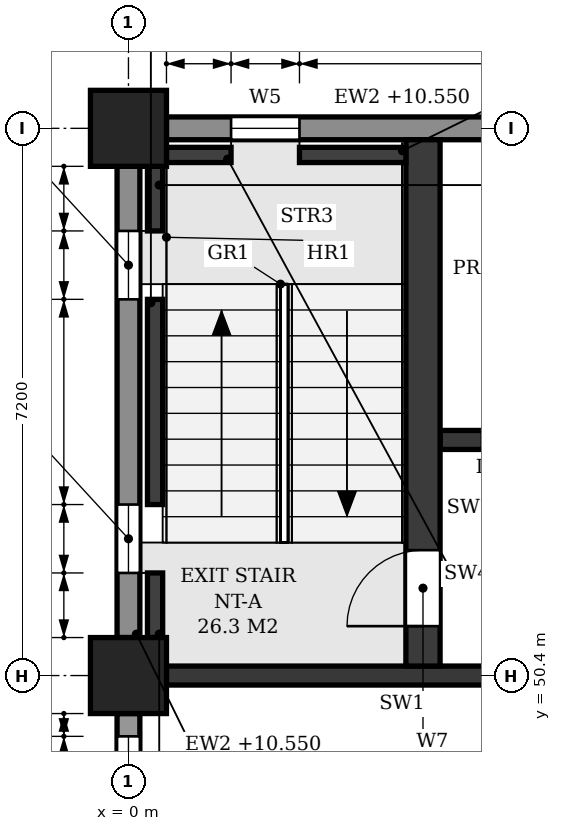
"""IFC4 building model, lengths in metres.
Left out: names, types, materials, properties, quantities, classifications, styles, units other than length and angle.
Written with IfcOpenShell. Run it as: python <this file> out.ifc"""

import sys

from ifc_helpers import new_model, si_unit, direction, frame, frame_2d, origin, origin_2d, place, context, subcontext, project, spatial, polyline, rectangle, outline, extrude, element, fill, save


model = new_model("IFC4")
c1 = context("Model", 3, precision=1e-05, world=origin(), true_north=direction((0.0, 1.0)))
c2 = subcontext(c1, "Body", "Model", "MODEL_VIEW")
j1 = project(units=[si_unit("LENGTHUNIT", "METRE"), si_unit("PLANEANGLEUNIT", "RADIAN")], contexts=[c1])
p1 = place(None, origin())
s1 = spatial("IfcSite", under=j1, at=p1, CompositionType="ELEMENT")
p2 = place(p1, origin())
s2 = spatial("IfcBuilding", under=s1, at=p2, CompositionType="ELEMENT")
p3 = place(p2, frame((0.0, 0.0, 6.0)))
s3 = spatial("IfcBuildingStorey", under=s2, at=p3, CompositionType="ELEMENT", Elevation=6.0)
for number, where, z_axis, x_axis in (
    (1, (0.0, 50.4, 0.0), (0.0, 0.0, 1.0), (1.0, 0.0, 0.0)),
    (2, (0.0, 57.6, 0.0), (0.0, 0.0, 1.0), (1.0, 0.0, 0.0)),
):
    element("IfcColumn", number, at=place(p3, frame(where, z_axis=z_axis, x_axis=x_axis)), inside=s3, PredefinedType="COLUMN", context=c2, shape_type="SweptSolid", body=[
        extrude(rectangle(XDim=1.0, YDim=1.0, at=origin_2d()), origin(), (0.0, 0.0, 1.0), 5.4),
    ])
p4 = place(p3, frame((0.0, 43.7, 0.0), z_axis=(0.0, 0.0, 1.0), x_axis=(0.0, 1.0, 0.0)))
e3 = element("IfcWall", 3, at=p4, inside=s3, PredefinedType="STANDARD", context=c2, shape_type="SweptSolid", body=[
    extrude(rectangle(XDim=6.2, YDim=0.3, at=frame_2d((3.1, 0.0))), origin(), (0.0, 0.0, 1.0), 4.55),
])
p5 = place(p4, frame((0.3, 0.0, 0.9)))
e4 = element("IfcOpeningElement", 4, at=p5, cuts=e3, PredefinedType="OPENING", context=c2, shape_type="SweptSolid", body=[
    extrude(outline(polyline([(0.0, 0.0), (0.85, 0.0), (0.85, 3.15), (0.425, 3.6), (0.0, 3.15), (0.0, 0.0)])), frame((0.0, 0.16, 0.0), z_axis=(0.0, -1.0, 0.0), x_axis=(1.0, 0.0, 0.0)), (0.0, 0.0, 1.0), 0.32),
])
p6 = place(p4, frame((1.45, 0.0, 0.9)))
e5 = element("IfcOpeningElement", 5, at=p6, cuts=e3, PredefinedType="OPENING", context=c2, shape_type="SweptSolid", body=[
    extrude(outline(polyline([(0.0, 0.0), (0.85, 0.0), (0.85, 3.15), (0.425, 3.6), (0.0, 3.15), (0.0, 0.0)])), frame((0.0, 0.16, 0.0), z_axis=(0.0, -1.0, 0.0), x_axis=(1.0, 0.0, 0.0)), (0.0, 0.0, 1.0), 0.32),
])
p7 = place(p4, frame((3.9, 0.0, 0.9)))
e6 = element("IfcOpeningElement", 6, at=p7, cuts=e3, PredefinedType="OPENING", context=c2, shape_type="SweptSolid", body=[
    extrude(outline(polyline([(0.0, 0.0), (0.85, 0.0), (0.85, 3.15), (0.425, 3.6), (0.0, 3.15), (0.0, 0.0)])), frame((0.0, 0.16, 0.0), z_axis=(0.0, -1.0, 0.0), x_axis=(1.0, 0.0, 0.0)), (0.0, 0.0, 1.0), 0.32),
])
p8 = place(p4, frame((5.05, 0.0, 0.9)))
e7 = element("IfcOpeningElement", 7, at=p8, cuts=e3, PredefinedType="OPENING", context=c2, shape_type="SweptSolid", body=[
    extrude(outline(polyline([(0.0, 0.0), (0.85, 0.0), (0.85, 3.15), (0.425, 3.6), (0.0, 3.15), (0.0, 0.0)])), frame((0.0, 0.16, 0.0), z_axis=(0.0, -1.0, 0.0), x_axis=(1.0, 0.0, 0.0)), (0.0, 0.0, 1.0), 0.32),
])
p9 = place(p3, frame((0.0, 50.9, 0.0), z_axis=(0.0, 0.0, 1.0), x_axis=(0.0, 1.0, 0.0)))
e8 = element("IfcWall", 8, at=p9, inside=s3, PredefinedType="STANDARD", context=c2, shape_type="SweptSolid", body=[
    extrude(rectangle(XDim=6.2, YDim=0.3, at=frame_2d((3.1, 0.0))), origin(), (0.0, 0.0, 1.0), 4.55),
])
p10 = place(p9, frame((0.85, 0.0, 0.9)))
e9 = element("IfcOpeningElement", 9, at=p10, cuts=e8, PredefinedType="OPENING", context=c2, shape_type="SweptSolid", body=[
    extrude(outline(polyline([(0.0, 0.0), (0.9, 0.0), (0.9, 3.15), (0.45, 3.6), (0.0, 3.15), (0.0, 0.0)])), frame((0.0, 0.16, 0.0), z_axis=(0.0, -1.0, 0.0), x_axis=(1.0, 0.0, 0.0)), (0.0, 0.0, 1.0), 0.32),
])
p11 = place(p9, frame((4.45, 0.0, 0.9)))
e10 = element("IfcOpeningElement", 10, at=p11, cuts=e8, PredefinedType="OPENING", context=c2, shape_type="SweptSolid", body=[
    extrude(outline(polyline([(0.0, 0.0), (0.9, 0.0), (0.9, 3.15), (0.45, 3.6), (0.0, 3.15), (0.0, 0.0)])), frame((0.0, 0.16, 0.0), z_axis=(0.0, -1.0, 0.0), x_axis=(1.0, 0.0, 0.0)), (0.0, 0.0, 1.0), 0.32),
])
p12 = place(p3, frame((6.7, 57.6, 0.0), z_axis=(0.0, 0.0, 1.0), x_axis=(-1.0, 0.0, 0.0)))
e11 = element("IfcWall", 11, at=p12, inside=s3, PredefinedType="STANDARD", context=c2, shape_type="SweptSolid", body=[
    extrude(rectangle(XDim=6.2, YDim=0.3, at=frame_2d((3.1, 0.0))), origin(), (0.0, 0.0, 1.0), 4.55),
])
p13 = place(p12, frame((4.45, 0.0, 0.9)))
e12 = element("IfcOpeningElement", 12, at=p13, cuts=e11, PredefinedType="OPENING", context=c2, shape_type="SweptSolid", body=[
    extrude(outline(polyline([(0.0, 0.0), (0.9, 0.0), (0.9, 3.15), (0.45, 3.6), (0.0, 3.15), (0.0, 0.0)])), frame((0.0, 0.16, 0.0), z_axis=(0.0, -1.0, 0.0), x_axis=(1.0, 0.0, 0.0)), (0.0, 0.0, 1.0), 0.32),
])
p14 = place(p3, frame((0.5, 50.4, 0.0), z_axis=(0.0, 0.0, 1.0), x_axis=(1.0, 0.0, 0.0)))
e13 = element("IfcWall", 13, at=p14, inside=s3, PredefinedType="SHEAR", context=c2, shape_type="SweptSolid", body=[
    extrude(rectangle(XDim=6.2, YDim=0.25, at=frame_2d((3.1, 0.0))), origin(), (0.0, 0.0, 1.0), 4.4),
])
p15 = place(p14, frame((4.75, 0.0, 0.0)))
e14 = element("IfcOpeningElement", 14, at=p15, cuts=e13, PredefinedType="OPENING", context=c2, shape_type="SweptSolid", body=[
    extrude(rectangle(XDim=1.1, YDim=2.1, at=frame_2d((0.55, 1.05))), frame((0.0, 0.135, 0.0), z_axis=(0.0, -1.0, 0.0), x_axis=(1.0, 0.0, 0.0)), (0.0, 0.0, 1.0), 0.27),
])
p16 = place(p3, frame((0.35, 50.9, -0.25), z_axis=(0.0, 0.0, 1.0), x_axis=(0.0, 1.0, 0.0)))
e15 = element("IfcWall", 15, at=p16, inside=s3, PredefinedType="SHEAR", context=c2, shape_type="SweptSolid", body=[
    extrude(rectangle(XDim=0.85, YDim=0.2, at=frame_2d((0.425, 0.0))), origin(), (0.0, 0.0, 1.0), 5.4),
])
p17 = place(p3, frame((0.35, 52.65, -0.25), z_axis=(0.0, 0.0, 1.0), x_axis=(0.0, 1.0, 0.0)))
e16 = element("IfcWall", 16, at=p17, inside=s3, PredefinedType="SHEAR", context=c2, shape_type="SweptSolid", body=[
    extrude(rectangle(XDim=2.7, YDim=0.2, at=frame_2d((1.35, 0.0))), origin(), (0.0, 0.0, 1.0), 5.4),
])
for number, where, z_axis, x_axis in (
    (17, (0.35, 56.25, -0.25), (0.0, 0.0, 1.0), (0.0, 1.0, 0.0)),
    (18, (0.5, 57.25, -0.25), (0.0, 0.0, 1.0), (1.0, 0.0, 0.0)),
):
    element("IfcWall", number, at=place(p3, frame(where, z_axis=z_axis, x_axis=x_axis)), inside=s3, PredefinedType="SHEAR", context=c2, shape_type="SweptSolid", body=[
        extrude(rectangle(XDim=0.85, YDim=0.2, at=frame_2d((0.425, 0.0))), origin(), (0.0, 0.0, 1.0), 5.4),
    ])
p18 = place(p3, frame((2.25, 57.25, -0.25), z_axis=(0.0, 0.0, 1.0), x_axis=(1.0, 0.0, 0.0)))
e19 = element("IfcWall", 19, at=p18, inside=s3, PredefinedType="SHEAR", context=c2, shape_type="SweptSolid", body=[
    extrude(rectangle(XDim=1.4, YDim=0.2, at=frame_2d((0.7, 0.0))), origin(), (0.0, 0.0, 1.0), 5.4),
])
p19 = place(p3, frame((3.875, 50.525, 0.0), z_axis=(0.0, 0.0, 1.0), x_axis=(0.0, 1.0, 0.0)))
e20 = element("IfcWall", 20, at=p19, inside=s3, PredefinedType="SHEAR", context=c2, shape_type="SweptSolid", body=[
    extrude(rectangle(XDim=6.925, YDim=0.45, at=frame_2d((3.462, 0.0))), origin(), (0.0, 0.0, 1.0), 5.15),
])
p20 = place(p19, frame((0.525, 0.0, 0.0)))
e21 = element("IfcOpeningElement", 21, at=p20, cuts=e20, PredefinedType="OPENING", context=c2, shape_type="SweptSolid", body=[
    extrude(rectangle(XDim=1.0, YDim=2.1, at=frame_2d((0.5, 1.05))), frame((0.0, 0.235, 0.0), z_axis=(0.0, -1.0, 0.0), x_axis=(1.0, 0.0, 0.0)), (0.0, 0.0, 1.0), 0.47),
])
p21 = place(p3, frame((4.1, 53.5, 0.0), z_axis=(0.0, 0.0, 1.0), x_axis=(1.0, 0.0, 0.0)))
e22 = element("IfcWall", 22, at=p21, inside=s3, PredefinedType="SHEAR", context=c2, shape_type="SweptSolid", body=[
    extrude(rectangle(XDim=2.975, YDim=0.25, at=frame_2d((1.487, 0.0))), origin(), (0.0, 0.0, 1.0), 5.15),
])
p22 = place(p21, frame((0.55, 0.0, 0.0)))
e23 = element("IfcOpeningElement", 23, at=p22, cuts=e22, PredefinedType="OPENING", context=c2, shape_type="SweptSolid", body=[
    extrude(rectangle(XDim=0.9, YDim=2.1, at=frame_2d((0.45, 1.05))), frame((0.0, 0.135, 0.0), z_axis=(0.0, -1.0, 0.0), x_axis=(1.0, 0.0, 0.0)), (0.0, 0.0, 1.0), 0.27),
])
p23 = place(p13, origin())
e24 = element("IfcWindow", 24, at=p23, inside=s3, PartitioningType="SINGLE_PANEL", PredefinedType="WINDOW", context=c2, shape_type="SweptSolid", body=[
    extrude(outline(polyline([(0.0, 0.0), (0.9, 0.0), (0.9, 3.15), (0.45, 3.6), (0.0, 3.15), (0.0, 0.0)])), frame((0.0, 0.03, 0.0), z_axis=(0.0, -1.0, 0.0), x_axis=(1.0, 0.0, 0.0)), (0.0, 0.0, 1.0), 0.06),
])
fill(e12, e24)
p24 = place(p8, origin())
e25 = element("IfcWindow", 25, at=p24, inside=s3, PartitioningType="SINGLE_PANEL", PredefinedType="WINDOW", context=c2, shape_type="SweptSolid", body=[
    extrude(outline(polyline([(0.0, 0.0), (0.85, 0.0), (0.85, 3.15), (0.425, 3.6), (0.0, 3.15), (0.0, 0.0)])), frame((0.0, 0.03, 0.0), z_axis=(0.0, -1.0, 0.0), x_axis=(1.0, 0.0, 0.0)), (0.0, 0.0, 1.0), 0.06),
])
fill(e7, e25)
p25 = place(p10, origin())
e26 = element("IfcWindow", 26, at=p25, inside=s3, PartitioningType="SINGLE_PANEL", PredefinedType="WINDOW", context=c2, shape_type="SweptSolid", body=[
    extrude(outline(polyline([(0.0, 0.0), (0.9, 0.0), (0.9, 3.15), (0.45, 3.6), (0.0, 3.15), (0.0, 0.0)])), frame((0.0, 0.03, 0.0), z_axis=(0.0, -1.0, 0.0), x_axis=(1.0, 0.0, 0.0)), (0.0, 0.0, 1.0), 0.06),
])
fill(e9, e26)
p26 = place(p11, origin())
e27 = element("IfcWindow", 27, at=p26, inside=s3, PartitioningType="SINGLE_PANEL", PredefinedType="WINDOW", context=c2, shape_type="SweptSolid", body=[
    extrude(outline(polyline([(0.0, 0.0), (0.9, 0.0), (0.9, 3.15), (0.45, 3.6), (0.0, 3.15), (0.0, 0.0)])), frame((0.0, 0.03, 0.0), z_axis=(0.0, -1.0, 0.0), x_axis=(1.0, 0.0, 0.0)), (0.0, 0.0, 1.0), 0.06),
])
fill(e10, e27)
p27 = place(p20, origin())
e28 = element("IfcDoor", 28, at=p27, inside=s3, OperationType="SINGLE_SWING_LEFT", PredefinedType="DOOR", context=c2, shape_type="SweptSolid", body=[
    extrude(rectangle(XDim=1.0, YDim=2.1, at=frame_2d((0.5, 1.05))), frame((0.0, 0.025, 0.0), z_axis=(0.0, -1.0, 0.0), x_axis=(1.0, 0.0, 0.0)), (0.0, 0.0, 1.0), 0.05),
])
fill(e21, e28)
save(model, sys.argv[1])
